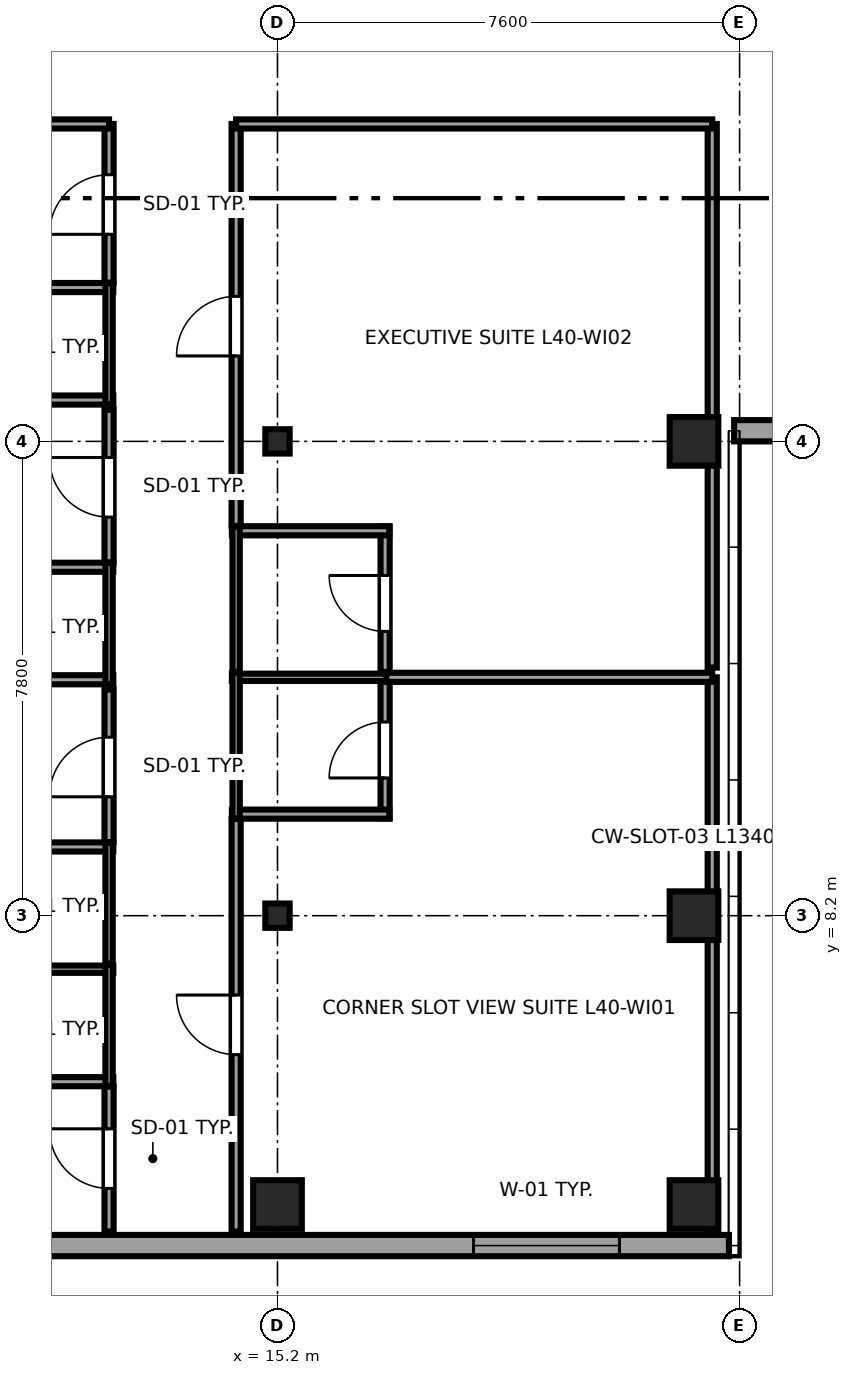
"""IFC4 building model, lengths in metres.
Left out: names, types, materials, properties, quantities, classifications, styles, units other than length and angle.
Written with IfcOpenShell. Run it as: python <this file> out.ifc"""

import sys

from ifc_helpers import new_model, si_unit, direction, frame, frame_2d, origin, origin_2d, place, context, subcontext, project, spatial, rectangle, i_section, extrude, source, transform, mapped, element, fill, save


model = new_model("IFC4")
c1 = context("Model", 3, precision=1e-05, world=origin(), true_north=direction((0.0, 1.0)))
c2 = subcontext(c1, "Body", "Model", "MODEL_VIEW")
j1 = project(units=[si_unit("LENGTHUNIT", "METRE"), si_unit("PLANEANGLEUNIT", "RADIAN")], contexts=[c1])
p1 = place(None, origin())
s1 = spatial("IfcSite", under=j1, at=p1, CompositionType="ELEMENT")
p2 = place(p1, origin())
s2 = spatial("IfcBuilding", under=s1, at=p2, CompositionType="ELEMENT")
p3 = place(p2, frame((0.0, 0.0, 154.15)))
s3 = spatial("IfcBuildingStorey", under=s2, at=p3, CompositionType="ELEMENT", Elevation=154.15)
m1 = source(origin(), c2, "Body", "SweptSolid", [
    extrude(rectangle(XDim=0.8, YDim=0.8, at=origin_2d()), origin(), (0.0, 0.0, 1.0), 3.55),
])
p4 = place(p3, frame((15.2, 3.45, 0.0), z_axis=(0.0, 0.0, 1.0), x_axis=(1.0, 0.0, 0.0)))
e1 = element("IfcColumn", 1, at=p4, inside=s3, PredefinedType="COLUMN", context=c2, shape_type="MappedRepresentation", body=[
    mapped(m1, transform((0.0, 0.0, 0.0), x_axis=(1.0, 0.0, 0.0), y_axis=(0.0, 1.0, 0.0), z_axis=(0.0, 0.0, 1.0), scale=1.0)),
])
m2 = source(origin(), c2, "Body", "SweptSolid", [
    extrude(i_section(OverallWidth=0.4, OverallDepth=0.4, WebThickness=0.02, FlangeThickness=0.035, at=origin_2d()), origin(), (0.0, 0.0, 1.0), 3.55),
])
for number, where, z_axis, x_axis in (
    (2, (15.2, 8.2, 0.0), (0.0, 0.0, 1.0), (1.0, 0.0, 0.0)),
    (3, (15.2, 16.0, 0.0), (0.0, 0.0, 1.0), (1.0, 0.0, 0.0)),
):
    element("IfcColumn", number, at=place(p3, frame(where, z_axis=z_axis, x_axis=x_axis)), inside=s3, PredefinedType="COLUMN", context=c2, shape_type="MappedRepresentation", body=[
        mapped(m2, transform((0.0, 0.0, 0.0), x_axis=(1.0, 0.0, 0.0), y_axis=(0.0, 1.0, 0.0), z_axis=(0.0, 0.0, 1.0), scale=1.0)),
    ])
for number, where, z_axis, x_axis in (
    (4, (22.05, 3.45, 0.0), (0.0, 0.0, 1.0), (1.0, 0.0, 0.0)),
    (5, (22.05, 8.2, 0.0), (0.0, 0.0, 1.0), (1.0, 0.0, 0.0)),
    (6, (22.05, 16.0, 0.0), (0.0, 0.0, 1.0), (1.0, 0.0, 0.0)),
):
    element("IfcColumn", number, at=place(p3, frame(where, z_axis=z_axis, x_axis=x_axis)), inside=s3, PredefinedType="COLUMN", context=c2, shape_type="MappedRepresentation", body=[
        mapped(m1, transform((0.0, 0.0, 0.0), x_axis=(1.0, 0.0, 0.0), y_axis=(0.0, 1.0, 0.0), z_axis=(0.0, 0.0, 1.0), scale=1.0)),
    ])
p5 = place(p3, frame((7.017, 2.775, 0.0), z_axis=(0.0, 0.0, 1.0), x_axis=(1.0, 0.0, 0.0)))
e7 = element("IfcWall", 7, at=p5, inside=s3, PredefinedType="SOLIDWALL", context=c2, shape_type="SweptSolid", body=[
    extrude(rectangle(XDim=15.608, YDim=0.35, at=frame_2d((7.804, 0.0))), origin(), (0.0, 0.0, 1.0), 3.37),
])
p6 = place(p5, frame((1.801, 0.0, 0.68)))
e8 = element("IfcOpeningElement", 8, at=p6, cuts=e7, PredefinedType="OPENING", context=c2, shape_type="SweptSolid", body=[
    extrude(rectangle(XDim=2.4, YDim=1.9, at=frame_2d((1.2, 0.95))), frame((0.0, 0.185, 0.0), z_axis=(0.0, -1.0, 0.0), x_axis=(1.0, 0.0, 0.0)), (0.0, 0.0, 1.0), 0.37),
])
p7 = place(p5, frame((11.407, 0.0, 0.68)))
e9 = element("IfcOpeningElement", 9, at=p7, cuts=e7, PredefinedType="OPENING", context=c2, shape_type="SweptSolid", body=[
    extrude(rectangle(XDim=2.4, YDim=1.9, at=frame_2d((1.2, 0.95))), frame((0.0, 0.185, 0.0), z_axis=(0.0, -1.0, 0.0), x_axis=(1.0, 0.0, 0.0)), (0.0, 0.0, 1.0), 0.37),
])
p8 = place(p3, frame((22.71, 16.175, 0.0), z_axis=(0.0, 0.0, 1.0), x_axis=(1.0, 0.0, 0.0)))
e10 = element("IfcWall", 10, at=p8, inside=s3, PredefinedType="SOLIDWALL", context=c2, shape_type="SweptSolid", body=[
    extrude(rectangle(XDim=11.58, YDim=0.35, at=frame_2d((5.79, 0.0))), origin(), (0.0, 0.0, 1.0), 2.758),
])
p9 = place(p8, frame((1.995, 0.0, 0.68)))
e11 = element("IfcOpeningElement", 11, at=p9, cuts=e10, PredefinedType="OPENING", context=c2, shape_type="SweptSolid", body=[
    extrude(rectangle(XDim=2.4, YDim=1.9, at=frame_2d((1.2, 0.95))), frame((0.0, 0.185, 0.0), z_axis=(0.0, -1.0, 0.0), x_axis=(1.0, 0.0, 0.0)), (0.0, 0.0, 1.0), 0.37),
])
p10 = place(p8, frame((7.185, 0.0, 0.68)))
e12 = element("IfcOpeningElement", 12, at=p10, cuts=e10, PredefinedType="OPENING", context=c2, shape_type="SweptSolid", body=[
    extrude(rectangle(XDim=2.4, YDim=1.9, at=frame_2d((1.2, 0.95))), frame((0.0, 0.185, 0.0), z_axis=(0.0, -1.0, 0.0), x_axis=(1.0, 0.0, 0.0)), (0.0, 0.0, 1.0), 0.37),
])
p11 = place(p3, frame((9.91, 5.47, 0.0), z_axis=(0.0, 0.0, 1.0), x_axis=(1.0, 0.0, 0.0)))
e13 = element("IfcWall", 13, at=p11, inside=s3, PredefinedType="PARTITIONING", context=c2, shape_type="SweptSolid", body=[
    extrude(rectangle(XDim=2.59, YDim=0.15, at=frame_2d((1.295, 0.0))), origin(), (0.0, 0.0, 1.0), 3.37),
])
p12 = place(p3, frame((9.91, 7.32, 0.0), z_axis=(0.0, 0.0, 1.0), x_axis=(1.0, 0.0, 0.0)))
e14 = element("IfcWall", 14, at=p12, inside=s3, PredefinedType="PLUMBINGWALL", context=c2, shape_type="SweptSolid", body=[
    extrude(rectangle(XDim=2.59, YDim=0.12, at=frame_2d((1.295, 0.0))), origin(), (0.0, 0.0, 1.0), 3.37),
])
p13 = place(p3, frame((12.43, 5.4, 0.0), z_axis=(0.0, 0.0, 1.0), x_axis=(0.0, 1.0, 0.0)))
e15 = element("IfcWall", 15, at=p13, inside=s3, PredefinedType="PLUMBINGWALL", context=c2, shape_type="SweptSolid", body=[
    extrude(rectangle(XDim=1.99, YDim=0.12, at=frame_2d((0.995, 0.0))), origin(), (0.0, 0.0, 1.0), 3.37),
])
p14 = place(p3, frame((9.91, 9.33, 0.0), z_axis=(0.0, 0.0, 1.0), x_axis=(1.0, 0.0, 0.0)))
e16 = element("IfcWall", 16, at=p14, inside=s3, PredefinedType="PARTITIONING", context=c2, shape_type="SweptSolid", body=[
    extrude(rectangle(XDim=2.59, YDim=0.15, at=frame_2d((1.295, 0.0))), origin(), (0.0, 0.0, 1.0), 3.37),
])
p15 = place(p3, frame((12.43, 7.41, 0.0), z_axis=(0.0, 0.0, 1.0), x_axis=(0.0, 1.0, 0.0)))
e17 = element("IfcWall", 17, at=p15, inside=s3, PredefinedType="PLUMBINGWALL", context=c2, shape_type="SweptSolid", body=[
    extrude(rectangle(XDim=1.99, YDim=0.12, at=frame_2d((0.995, 0.0))), origin(), (0.0, 0.0, 1.0), 3.37),
])
p16 = place(p3, frame((2.9, 12.08, 0.0), z_axis=(0.0, 0.0, 1.0), x_axis=(1.0, 0.0, 0.0)))
e18 = element("IfcWall", 18, at=p16, inside=s3, PredefinedType="PARTITIONING", context=c2, shape_type="SweptSolid", body=[
    extrude(rectangle(XDim=9.6, YDim=0.15, at=frame_2d((4.8, 0.0))), origin(), (0.0, 0.0, 1.0), 3.37),
])
p17 = place(p3, frame((9.91, 13.93, 0.0), z_axis=(0.0, 0.0, 1.0), x_axis=(1.0, 0.0, 0.0)))
e19 = element("IfcWall", 19, at=p17, inside=s3, PredefinedType="PARTITIONING", context=c2, shape_type="SweptSolid", body=[
    extrude(rectangle(XDim=2.59, YDim=0.15, at=frame_2d((1.295, 0.0))), origin(), (0.0, 0.0, 1.0), 3.37),
])
p18 = place(p3, frame((12.43, 12.01, 0.0), z_axis=(0.0, 0.0, 1.0), x_axis=(0.0, 1.0, 0.0)))
e20 = element("IfcWall", 20, at=p18, inside=s3, PredefinedType="PLUMBINGWALL", context=c2, shape_type="SweptSolid", body=[
    extrude(rectangle(XDim=1.99, YDim=0.12, at=frame_2d((0.995, 0.0))), origin(), (0.0, 0.0, 1.0), 3.37),
])
p19 = place(p3, frame((2.9, 16.68, 0.0), z_axis=(0.0, 0.0, 1.0), x_axis=(1.0, 0.0, 0.0)))
e21 = element("IfcWall", 21, at=p19, inside=s3, PredefinedType="PARTITIONING", context=c2, shape_type="SweptSolid", body=[
    extrude(rectangle(XDim=9.6, YDim=0.15, at=frame_2d((4.8, 0.0))), origin(), (0.0, 0.0, 1.0), 3.37),
])
p20 = place(p3, frame((9.91, 18.53, 0.0), z_axis=(0.0, 0.0, 1.0), x_axis=(1.0, 0.0, 0.0)))
e22 = element("IfcWall", 22, at=p20, inside=s3, PredefinedType="PARTITIONING", context=c2, shape_type="SweptSolid", body=[
    extrude(rectangle(XDim=2.59, YDim=0.15, at=frame_2d((1.295, 0.0))), origin(), (0.0, 0.0, 1.0), 3.37),
])
p21 = place(p3, frame((12.43, 16.61, 0.0), z_axis=(0.0, 0.0, 1.0), x_axis=(0.0, 1.0, 0.0)))
e23 = element("IfcWall", 23, at=p21, inside=s3, PredefinedType="PLUMBINGWALL", context=c2, shape_type="SweptSolid", body=[
    extrude(rectangle(XDim=1.99, YDim=0.12, at=frame_2d((0.995, 0.0))), origin(), (0.0, 0.0, 1.0), 3.37),
])
p22 = place(p3, frame((16.97, 9.8, 0.0), z_axis=(0.0, 0.0, 1.0), x_axis=(0.0, 1.0, 0.0)))
e24 = element("IfcWall", 24, at=p22, inside=s3, PredefinedType="PARTITIONING", context=c2, shape_type="SweptSolid", body=[
    extrude(rectangle(XDim=2.39, YDim=0.15, at=frame_2d((1.195, 0.0))), origin(), (0.0, 0.0, 1.0), 3.37),
])
p23 = place(p22, frame((0.665, 0.0, 0.0)))
e25 = element("IfcOpeningElement", 25, at=p23, cuts=e24, PredefinedType="OPENING", context=c2, shape_type="SweptSolid", body=[
    extrude(rectangle(XDim=0.92, YDim=2.01, at=frame_2d((0.46, 1.005))), frame((0.0, 0.085, 0.0), z_axis=(0.0, -1.0, 0.0), x_axis=(1.0, 0.0, 0.0)), (0.0, 0.0, 1.0), 0.17),
])
p24 = place(p3, frame((14.45, 9.87, 0.0), z_axis=(0.0, 0.0, 1.0), x_axis=(1.0, 0.0, 0.0)))
e26 = element("IfcWall", 26, at=p24, inside=s3, PredefinedType="PARTITIONING", context=c2, shape_type="SweptSolid", body=[
    extrude(rectangle(XDim=2.59, YDim=0.15, at=frame_2d((1.295, 0.0))), origin(), (0.0, 0.0, 1.0), 3.37),
])
p25 = place(p3, frame((14.45, 12.12, 0.0), z_axis=(0.0, 0.0, 1.0), x_axis=(1.0, 0.0, 0.0)))
e27 = element("IfcWall", 27, at=p25, inside=s3, PredefinedType="PLUMBINGWALL", context=c2, shape_type="SweptSolid", body=[
    extrude(rectangle(XDim=2.59, YDim=0.12, at=frame_2d((1.295, 0.0))), origin(), (0.0, 0.0, 1.0), 3.37),
])
p26 = place(p3, frame((14.52, 9.8, 0.0), z_axis=(0.0, 0.0, 1.0), x_axis=(0.0, 1.0, 0.0)))
e28 = element("IfcWall", 28, at=p26, inside=s3, PredefinedType="PLUMBINGWALL", context=c2, shape_type="SweptSolid", body=[
    extrude(rectangle(XDim=2.39, YDim=0.12, at=frame_2d((1.195, 0.0))), origin(), (0.0, 0.0, 1.0), 3.37),
])
p27 = place(p3, frame((16.97, 12.21, 0.0), z_axis=(0.0, 0.0, 1.0), x_axis=(0.0, 1.0, 0.0)))
e29 = element("IfcWall", 29, at=p27, inside=s3, PredefinedType="PARTITIONING", context=c2, shape_type="SweptSolid", body=[
    extrude(rectangle(XDim=2.39, YDim=0.15, at=frame_2d((1.195, 0.0))), origin(), (0.0, 0.0, 1.0), 3.37),
])
p28 = place(p27, frame((0.665, 0.0, 0.0)))
e30 = element("IfcOpeningElement", 30, at=p28, cuts=e29, PredefinedType="OPENING", context=c2, shape_type="SweptSolid", body=[
    extrude(rectangle(XDim=0.92, YDim=2.01, at=frame_2d((0.46, 1.005))), frame((0.0, 0.085, 0.0), z_axis=(0.0, -1.0, 0.0), x_axis=(1.0, 0.0, 0.0)), (0.0, 0.0, 1.0), 0.17),
])
p29 = place(p3, frame((14.45, 14.53, 0.0), z_axis=(0.0, 0.0, 1.0), x_axis=(1.0, 0.0, 0.0)))
e31 = element("IfcWall", 31, at=p29, inside=s3, PredefinedType="PARTITIONING", context=c2, shape_type="SweptSolid", body=[
    extrude(rectangle(XDim=2.59, YDim=0.15, at=frame_2d((1.295, 0.0))), origin(), (0.0, 0.0, 1.0), 3.37),
])
p30 = place(p3, frame((14.52, 12.21, 0.0), z_axis=(0.0, 0.0, 1.0), x_axis=(0.0, 1.0, 0.0)))
e32 = element("IfcWall", 32, at=p30, inside=s3, PredefinedType="PLUMBINGWALL", context=c2, shape_type="SweptSolid", body=[
    extrude(rectangle(XDim=2.39, YDim=0.12, at=frame_2d((1.195, 0.0))), origin(), (0.0, 0.0, 1.0), 3.37),
])
p31 = place(p3, frame((12.43, 3.005, 0.0), z_axis=(0.0, 0.0, 1.0), x_axis=(0.0, 1.0, 0.0)))
e33 = element("IfcWall", 33, at=p31, inside=s3, PredefinedType="PARTITIONING", context=c2, shape_type="SweptSolid", body=[
    extrude(rectangle(XDim=2.385, YDim=0.15, at=frame_2d((1.192, 0.0))), origin(), (0.0, 0.0, 1.0), 3.37),
])
p32 = place(p31, frame((0.71, 0.0, 0.0)))
e34 = element("IfcOpeningElement", 34, at=p32, cuts=e33, PredefinedType="OPENING", context=c2, shape_type="SweptSolid", body=[
    extrude(rectangle(XDim=0.98, YDim=2.12, at=frame_2d((0.49, 1.06))), frame((0.0, 0.085, 0.0), z_axis=(0.0, -1.0, 0.0), x_axis=(1.0, 0.0, 0.0)), (0.0, 0.0, 1.0), 0.17),
])
p33 = place(p3, frame((12.43, 9.41, 0.0), z_axis=(0.0, 0.0, 1.0), x_axis=(0.0, 1.0, 0.0)))
e35 = element("IfcWall", 35, at=p33, inside=s3, PredefinedType="PARTITIONING", context=c2, shape_type="SweptSolid", body=[
    extrude(rectangle(XDim=2.51, YDim=0.15, at=frame_2d((1.255, 0.0))), origin(), (0.0, 0.0, 1.0), 3.37),
])
p34 = place(p33, frame((0.745, 0.0, 0.0)))
e36 = element("IfcOpeningElement", 36, at=p34, cuts=e35, PredefinedType="OPENING", context=c2, shape_type="SweptSolid", body=[
    extrude(rectangle(XDim=0.98, YDim=2.12, at=frame_2d((0.49, 1.06))), frame((0.0, 0.085, 0.0), z_axis=(0.0, -1.0, 0.0), x_axis=(1.0, 0.0, 0.0)), (0.0, 0.0, 1.0), 0.17),
])
p35 = place(p3, frame((12.43, 14.01, 0.0), z_axis=(0.0, 0.0, 1.0), x_axis=(0.0, 1.0, 0.0)))
e37 = element("IfcWall", 37, at=p35, inside=s3, PredefinedType="PARTITIONING", context=c2, shape_type="SweptSolid", body=[
    extrude(rectangle(XDim=2.51, YDim=0.15, at=frame_2d((1.255, 0.0))), origin(), (0.0, 0.0, 1.0), 3.37),
])
p36 = place(p35, frame((0.745, 0.0, 0.0)))
e38 = element("IfcOpeningElement", 38, at=p36, cuts=e37, PredefinedType="OPENING", context=c2, shape_type="SweptSolid", body=[
    extrude(rectangle(XDim=0.98, YDim=2.12, at=frame_2d((0.49, 1.06))), frame((0.0, 0.085, 0.0), z_axis=(0.0, -1.0, 0.0), x_axis=(1.0, 0.0, 0.0)), (0.0, 0.0, 1.0), 0.17),
])
p37 = place(p3, frame((12.43, 18.61, 0.0), z_axis=(0.0, 0.0, 1.0), x_axis=(0.0, 1.0, 0.0)))
e39 = element("IfcWall", 39, at=p37, inside=s3, PredefinedType="PARTITIONING", context=c2, shape_type="SweptSolid", body=[
    extrude(rectangle(XDim=2.61, YDim=0.15, at=frame_2d((1.305, 0.0))), origin(), (0.0, 0.0, 1.0), 3.37),
])
p38 = place(p37, frame((0.795, 0.0, 0.0)))
e40 = element("IfcOpeningElement", 40, at=p38, cuts=e39, PredefinedType="OPENING", context=c2, shape_type="SweptSolid", body=[
    extrude(rectangle(XDim=0.98, YDim=2.12, at=frame_2d((0.49, 1.06))), frame((0.0, 0.085, 0.0), z_axis=(0.0, -1.0, 0.0), x_axis=(1.0, 0.0, 0.0)), (0.0, 0.0, 1.0), 0.17),
])
p39 = place(p3, frame((2.9, 21.22, 0.0), z_axis=(0.0, 0.0, 1.0), x_axis=(1.0, 0.0, 0.0)))
e41 = element("IfcWall", 41, at=p39, inside=s3, PredefinedType="PARTITIONING", context=c2, shape_type="SweptSolid", body=[
    extrude(rectangle(XDim=9.53, YDim=0.15, at=frame_2d((4.765, 0.0))), origin(), (0.0, 0.0, 1.0), 3.37),
])
p40 = place(p3, frame((14.52, 3.005, 0.0), z_axis=(0.0, 0.0, 1.0), x_axis=(0.0, 1.0, 0.0)))
e42 = element("IfcWall", 42, at=p40, inside=s3, PredefinedType="PARTITIONING", context=c2, shape_type="SweptSolid", body=[
    extrude(rectangle(XDim=6.785, YDim=0.15, at=frame_2d((3.393, 0.0))), origin(), (0.0, 0.0, 1.0), 3.37),
])
p41 = place(p40, frame((2.91, 0.0, 0.0)))
e43 = element("IfcOpeningElement", 43, at=p41, cuts=e42, PredefinedType="OPENING", context=c2, shape_type="SweptSolid", body=[
    extrude(rectangle(XDim=0.98, YDim=2.12, at=frame_2d((0.49, 1.06))), frame((0.0, 0.085, 0.0), z_axis=(0.0, -1.0, 0.0), x_axis=(1.0, 0.0, 0.0)), (0.0, 0.0, 1.0), 0.17),
])
p42 = place(p3, frame((22.35, 3.005, 0.0), z_axis=(0.0, 0.0, 1.0), x_axis=(0.0, 1.0, 0.0)))
e44 = element("IfcWall", 44, at=p42, inside=s3, PredefinedType="PARTITIONING", context=c2, shape_type="SweptSolid", body=[
    extrude(rectangle(XDim=9.115, YDim=0.15, at=frame_2d((4.558, 0.0))), origin(), (0.0, 0.0, 1.0), 3.37),
])
p43 = place(p3, frame((16.99, 12.12, 0.0), z_axis=(0.0, 0.0, 1.0), x_axis=(1.0, 0.0, 0.0)))
e45 = element("IfcWall", 45, at=p43, inside=s3, PredefinedType="PARTITIONING", context=c2, shape_type="SweptSolid", body=[
    extrude(rectangle(XDim=5.36, YDim=0.15, at=frame_2d((2.68, 0.0))), origin(), (0.0, 0.0, 1.0), 3.37),
])
p44 = place(p3, frame((14.52, 14.61, 0.0), z_axis=(0.0, 0.0, 1.0), x_axis=(0.0, 1.0, 0.0)))
e46 = element("IfcWall", 46, at=p44, inside=s3, PredefinedType="PARTITIONING", context=c2, shape_type="SweptSolid", body=[
    extrude(rectangle(XDim=6.61, YDim=0.15, at=frame_2d((3.305, 0.0))), origin(), (0.0, 0.0, 1.0), 3.37),
])
p45 = place(p44, frame((2.795, 0.0, 0.0)))
e47 = element("IfcOpeningElement", 47, at=p45, cuts=e46, PredefinedType="OPENING", context=c2, shape_type="SweptSolid", body=[
    extrude(rectangle(XDim=0.98, YDim=2.12, at=frame_2d((0.49, 1.06))), frame((0.0, 0.085, 0.0), z_axis=(0.0, -1.0, 0.0), x_axis=(1.0, 0.0, 0.0)), (0.0, 0.0, 1.0), 0.17),
])
p46 = place(p3, frame((22.35, 12.28, 0.0), z_axis=(0.0, 0.0, 1.0), x_axis=(0.0, 1.0, 0.0)))
e48 = element("IfcWall", 48, at=p46, inside=s3, PredefinedType="PARTITIONING", context=c2, shape_type="SweptSolid", body=[
    extrude(rectangle(XDim=8.94, YDim=0.15, at=frame_2d((4.47, 0.0))), origin(), (0.0, 0.0, 1.0), 3.37),
])
p47 = place(p3, frame((14.52, 21.22, 0.0), z_axis=(0.0, 0.0, 1.0), x_axis=(1.0, 0.0, 0.0)))
e49 = element("IfcWall", 49, at=p47, inside=s3, PredefinedType="PARTITIONING", context=c2, shape_type="SweptSolid", body=[
    extrude(rectangle(XDim=7.83, YDim=0.15, at=frame_2d((3.915, 0.0))), origin(), (0.0, 0.0, 1.0), 3.37),
])
m3 = source(origin(), c2, "Body", "SweptSolid", [
    extrude(rectangle(XDim=2.4, YDim=1.9, at=frame_2d((1.2, 0.95))), frame((0.0, 0.09, 0.0), z_axis=(0.0, -1.0, 0.0), x_axis=(1.0, 0.0, 0.0)), (0.0, 0.0, 1.0), 0.06),
])
p48 = place(p7, origin())
e50 = element("IfcWindow", 50, at=p48, inside=s3, PartitioningType="TRIPLE_PANEL_HORIZONTAL", PredefinedType="WINDOW", context=c2, shape_type="MappedRepresentation", body=[
    mapped(m3, transform((0.0, 0.0, 0.0), x_axis=(1.0, 0.0, 0.0), y_axis=(0.0, 1.0, 0.0), z_axis=(0.0, 0.0, 1.0), scale=1.0)),
])
fill(e9, e50)
m4 = source(origin(), c2, "Body", "SweptSolid", [
    extrude(rectangle(XDim=0.92, YDim=2.01, at=frame_2d((0.46, 1.005))), frame((0.0, 0.025, 0.0), z_axis=(0.0, -1.0, 0.0), x_axis=(1.0, 0.0, 0.0)), (0.0, 0.0, 1.0), 0.05),
])
p49 = place(p23, origin())
e51 = element("IfcDoor", 51, at=p49, inside=s3, OperationType="SINGLE_SWING_LEFT", PredefinedType="DOOR", context=c2, shape_type="MappedRepresentation", body=[
    mapped(m4, transform((0.0, 0.0, 0.0), x_axis=(1.0, 0.0, 0.0), y_axis=(0.0, 1.0, 0.0), z_axis=(0.0, 0.0, 1.0), scale=1.0)),
])
fill(e25, e51)
p50 = place(p28, origin())
e52 = element("IfcDoor", 52, at=p50, inside=s3, OperationType="SINGLE_SWING_RIGHT", PredefinedType="DOOR", context=c2, shape_type="MappedRepresentation", body=[
    mapped(m4, transform((0.0, 0.0, 0.0), x_axis=(1.0, 0.0, 0.0), y_axis=(0.0, 1.0, 0.0), z_axis=(0.0, 0.0, 1.0), scale=1.0)),
])
fill(e30, e52)
m5 = source(origin(), c2, "Body", "SweptSolid", [
    extrude(rectangle(XDim=0.98, YDim=2.12, at=frame_2d((0.49, 1.06))), frame((0.0, 0.025, 0.0), z_axis=(0.0, -1.0, 0.0), x_axis=(1.0, 0.0, 0.0)), (0.0, 0.0, 1.0), 0.05),
])
p51 = place(p32, origin())
e53 = element("IfcDoor", 53, at=p51, inside=s3, OperationType="SINGLE_SWING_RIGHT", PredefinedType="DOOR", context=c2, shape_type="MappedRepresentation", body=[
    mapped(m5, transform((0.0, 0.0, 0.0), x_axis=(1.0, 0.0, 0.0), y_axis=(0.0, 1.0, 0.0), z_axis=(0.0, 0.0, 1.0), scale=1.0)),
])
fill(e34, e53)
p52 = place(p34, origin())
e54 = element("IfcDoor", 54, at=p52, inside=s3, OperationType="SINGLE_SWING_LEFT", PredefinedType="DOOR", context=c2, shape_type="MappedRepresentation", body=[
    mapped(m5, transform((0.0, 0.0, 0.0), x_axis=(1.0, 0.0, 0.0), y_axis=(0.0, 1.0, 0.0), z_axis=(0.0, 0.0, 1.0), scale=1.0)),
])
fill(e36, e54)
p53 = place(p36, origin())
e55 = element("IfcDoor", 55, at=p53, inside=s3, OperationType="SINGLE_SWING_RIGHT", PredefinedType="DOOR", context=c2, shape_type="MappedRepresentation", body=[
    mapped(m5, transform((0.0, 0.0, 0.0), x_axis=(1.0, 0.0, 0.0), y_axis=(0.0, 1.0, 0.0), z_axis=(0.0, 0.0, 1.0), scale=1.0)),
])
fill(e38, e55)
p54 = place(p38, origin())
e56 = element("IfcDoor", 56, at=p54, inside=s3, OperationType="SINGLE_SWING_LEFT", PredefinedType="DOOR", context=c2, shape_type="MappedRepresentation", body=[
    mapped(m5, transform((0.0, 0.0, 0.0), x_axis=(1.0, 0.0, 0.0), y_axis=(0.0, 1.0, 0.0), z_axis=(0.0, 0.0, 1.0), scale=1.0)),
])
fill(e40, e56)
p55 = place(p41, origin())
e57 = element("IfcDoor", 57, at=p55, inside=s3, OperationType="SINGLE_SWING_RIGHT", PredefinedType="DOOR", context=c2, shape_type="MappedRepresentation", body=[
    mapped(m5, transform((0.0, 0.0, 0.0), x_axis=(1.0, 0.0, 0.0), y_axis=(0.0, 1.0, 0.0), z_axis=(0.0, 0.0, 1.0), scale=1.0)),
])
fill(e43, e57)
p56 = place(p45, origin())
e58 = element("IfcDoor", 58, at=p56, inside=s3, OperationType="SINGLE_SWING_LEFT", PredefinedType="DOOR", context=c2, shape_type="MappedRepresentation", body=[
    mapped(m5, transform((0.0, 0.0, 0.0), x_axis=(1.0, 0.0, 0.0), y_axis=(0.0, 1.0, 0.0), z_axis=(0.0, 0.0, 1.0), scale=1.0)),
])
fill(e47, e58)
save(model, sys.argv[1])
